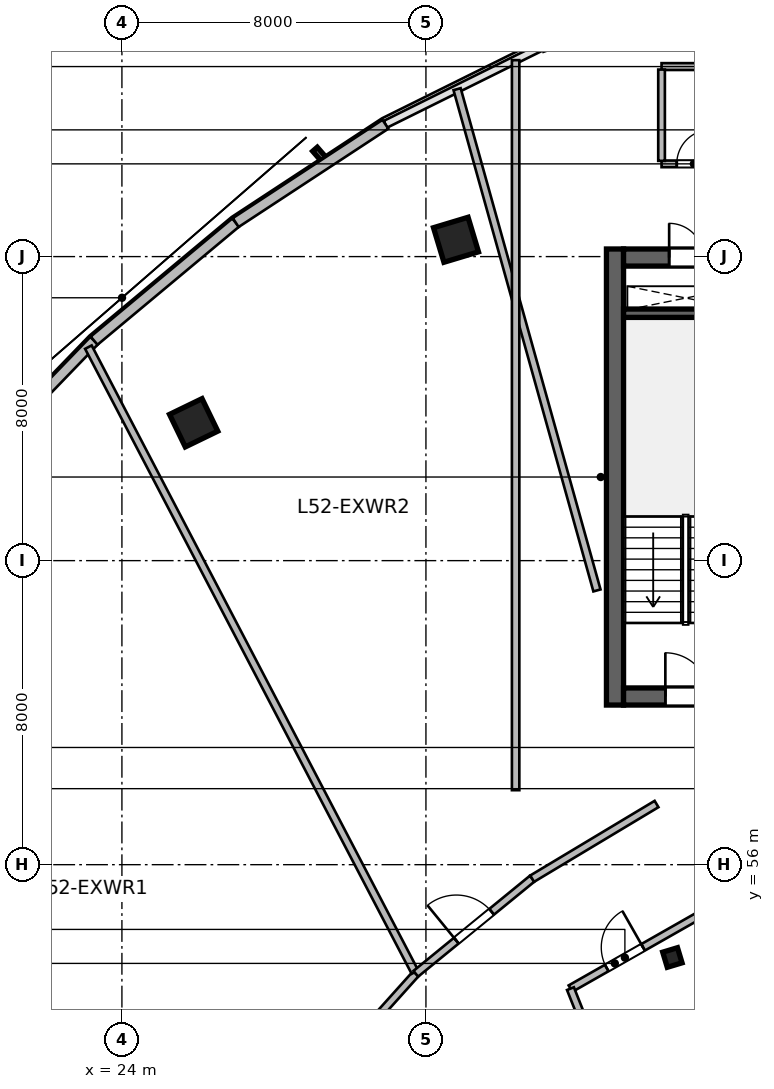
"""IFC4 building model, lengths in metres.
Left out: names, types, materials, properties, quantities, classifications, styles, units other than length and angle.
Written with IfcOpenShell. Run it as: python <this file> out.ifc"""

import sys

from ifc_helpers import new_model, si_unit, direction, frame, frame_2d, origin, origin_2d, place, context, subcontext, project, spatial, rectangle, i_section, extrude, source, transform, mapped, element, fill, save


model = new_model("IFC4")
c1 = context("Model", 3, precision=1e-05, world=origin(), true_north=direction((0.0, 1.0)))
c2 = subcontext(c1, "Body", "Model", "MODEL_VIEW")
j1 = project(units=[si_unit("LENGTHUNIT", "METRE"), si_unit("PLANEANGLEUNIT", "RADIAN")], contexts=[c1])
p1 = place(None, origin())
s1 = spatial("IfcSite", under=j1, at=p1, CompositionType="ELEMENT")
p2 = place(p1, origin())
s2 = spatial("IfcBuilding", under=s1, at=p2, CompositionType="ELEMENT")
p3 = place(p2, frame((0.0, 0.0, 215.7)))
s3 = spatial("IfcBuildingStorey", under=s2, at=p3, CompositionType="ELEMENT", Elevation=215.7)
m1 = source(origin(), c2, "Body", "SweptSolid", [
    extrude(rectangle(XDim=12.0, YDim=0.45, at=frame_2d((6.0, 0.0))), origin(), (0.0, 0.0, 1.0), 3.9),
])
p4 = place(p3, frame((36.975, 60.2, 0.0), z_axis=(0.0, 0.0, 1.0), x_axis=(0.0, 1.0, 0.0)))
e1 = element("IfcWall", 1, at=p4, inside=s3, PredefinedType="SHEAR", context=c2, shape_type="MappedRepresentation", body=[
    mapped(m1, transform((0.0, 0.0, 0.0), scale=1.0)),
])
m2 = source(origin(), c2, "Body", "SweptSolid", [
    extrude(rectangle(XDim=21.6, YDim=0.45, at=frame_2d((10.8, 0.0))), origin(), (0.0, 0.0, 1.0), 3.9),
])
p5 = place(p3, frame((37.2, 60.425, 0.0), z_axis=(0.0, 0.0, 1.0), x_axis=(1.0, 0.0, 0.0)))
e2 = element("IfcWall", 2, at=p5, inside=s3, PredefinedType="SHEAR", context=c2, shape_type="MappedRepresentation", body=[
    mapped(m2, transform((0.0, 0.0, 0.0), scale=1.0)),
])
p6 = place(p5, frame((1.1, 0.0, 0.0)))
e3 = element("IfcOpeningElement", 3, at=p6, cuts=e2, PredefinedType="OPENING", context=c2, shape_type="SweptSolid", body=[
    extrude(rectangle(XDim=1.15, YDim=2.15, at=frame_2d((0.575, 1.075))), frame((0.0, 0.235, 0.0), z_axis=(0.0, -1.0, 0.0), x_axis=(1.0, 0.0, 0.0)), (0.0, 0.0, 1.0), 0.47),
])
p7 = place(p5, frame((19.5, 0.0, 0.0)))
e4 = element("IfcOpeningElement", 4, at=p7, cuts=e2, PredefinedType="OPENING", context=c2, shape_type="SweptSolid", body=[
    extrude(rectangle(XDim=0.9, YDim=2.1, at=frame_2d((0.45, 1.05))), frame((0.0, 0.235, 0.0), z_axis=(0.0, -1.0, 0.0), x_axis=(1.0, 0.0, 0.0)), (0.0, 0.0, 1.0), 0.47),
])
p8 = place(p5, frame((12.02, 0.0, 0.0)))
e5 = element("IfcOpeningElement", 5, at=p8, cuts=e2, PredefinedType="OPENING", context=c2, shape_type="SweptSolid", body=[
    extrude(rectangle(XDim=1.6, YDim=2.15, at=frame_2d((0.8, 1.075))), frame((0.0, 0.235, 0.0), z_axis=(0.0, -1.0, 0.0), x_axis=(1.0, 0.0, 0.0)), (0.0, 0.0, 1.0), 0.47),
])
p9 = place(p3, frame((37.2, 71.975, 0.0), z_axis=(0.0, 0.0, 1.0), x_axis=(1.0, 0.0, 0.0)))
e6 = element("IfcWall", 6, at=p9, inside=s3, PredefinedType="SHEAR", context=c2, shape_type="MappedRepresentation", body=[
    mapped(m2, transform((0.0, 0.0, 0.0), scale=1.0)),
])
p10 = place(p9, frame((1.2, 0.0, 0.0)))
e7 = element("IfcOpeningElement", 7, at=p10, cuts=e6, PredefinedType="OPENING", context=c2, shape_type="SweptSolid", body=[
    extrude(rectangle(XDim=0.9, YDim=2.1, at=frame_2d((0.45, 1.05))), frame((0.0, 0.235, 0.0), z_axis=(0.0, -1.0, 0.0), x_axis=(1.0, 0.0, 0.0)), (0.0, 0.0, 1.0), 0.47),
])
p11 = place(p9, frame((14.7, 0.0, 0.0)))
e8 = element("IfcOpeningElement", 8, at=p11, cuts=e6, PredefinedType="OPENING", context=c2, shape_type="SweptSolid", body=[
    extrude(rectangle(XDim=1.2, YDim=2.15, at=frame_2d((0.6, 1.075))), frame((0.0, 0.235, 0.0), z_axis=(0.0, -1.0, 0.0), x_axis=(1.0, 0.0, 0.0)), (0.0, 0.0, 1.0), 0.47),
])
p12 = place(p9, frame((4.15, 0.0, 0.0)))
e9 = element("IfcOpeningElement", 9, at=p12, cuts=e6, PredefinedType="OPENING", context=c2, shape_type="SweptSolid", body=[
    extrude(rectangle(XDim=1.3, YDim=2.15, at=frame_2d((0.65, 1.075))), frame((0.0, 0.235, 0.0), z_axis=(0.0, -1.0, 0.0), x_axis=(1.0, 0.0, 0.0)), (0.0, 0.0, 1.0), 0.47),
])
p13 = place(p9, frame((7.25, 0.0, 0.0)))
e10 = element("IfcOpeningElement", 10, at=p13, cuts=e6, PredefinedType="OPENING", context=c2, shape_type="SweptSolid", body=[
    extrude(rectangle(XDim=0.9, YDim=2.1, at=frame_2d((0.45, 1.05))), frame((0.0, 0.235, 0.0), z_axis=(0.0, -1.0, 0.0), x_axis=(1.0, 0.0, 0.0)), (0.0, 0.0, 1.0), 0.47),
])
m3 = source(origin(), c2, "Body", "SweptSolid", [
    extrude(rectangle(XDim=3.27, YDim=0.22, at=frame_2d((1.635, 0.0))), origin(), (0.0, 0.0, 1.0), 3.9),
])
p14 = place(p3, frame((37.2, 70.51, 0.0), z_axis=(0.0, 0.0, 1.0), x_axis=(1.0, 0.0, 0.0)))
e11 = element("IfcWall", 11, at=p14, inside=s3, PredefinedType="SHEAR", context=c2, shape_type="MappedRepresentation", body=[
    mapped(m3, transform((0.0, 0.0, 0.0), scale=1.0)),
])
m4 = source(origin(), c2, "Body", "SweptSolid", [
    extrude(rectangle(XDim=0.95, YDim=0.95, at=origin_2d()), origin(), (0.0, 0.0, 1.0), 3.9),
])
p15 = place(p3, frame((25.888, 67.627, 0.0), z_axis=(0.0, 0.0, 1.0), x_axis=(-0.436173672171, 0.899862504889, 0.0)))
e12 = element("IfcColumn", 12, at=p15, inside=s3, PredefinedType="COLUMN", context=c2, shape_type="MappedRepresentation", body=[
    mapped(m4, transform((0.0, 0.0, 0.0), scale=1.0)),
])
m5 = source(origin(), c2, "Body", "SweptSolid", [
    extrude(i_section(OverallWidth=0.406, OverallDepth=0.416, WebThickness=0.03, FlangeThickness=0.048, at=origin_2d()), origin(), (0.0, 0.0, 1.0), 3.9),
])
p16 = place(p3, frame((38.485, 53.558, 0.0), z_axis=(0.0, 0.0, 1.0), x_axis=(-0.288697611798, 0.957420330337, 0.0)))
e13 = element("IfcColumn", 13, at=p16, inside=s3, PredefinedType="COLUMN", context=c2, shape_type="MappedRepresentation", body=[
    mapped(m5, transform((0.0, 0.0, 0.0), scale=1.0)),
])
p17 = place(p3, frame((32.791, 72.442, 0.0), z_axis=(0.0, 0.0, 1.0), x_axis=(-0.288697611798, 0.957420330337, 0.0)))
e14 = element("IfcColumn", 14, at=p17, inside=s3, PredefinedType="COLUMN", context=c2, shape_type="MappedRepresentation", body=[
    mapped(m4, transform((0.0, 0.0, 0.0), scale=1.0)),
])
m6 = source(origin(), c2, "Body", "SweptSolid", [
    extrude(rectangle(XDim=5.001, YDim=0.28, at=frame_2d((2.5, 0.0))), origin(), (0.0, 0.0, 1.0), 3.64),
])
p18 = place(p3, frame((19.795, 66.19, 0.0), z_axis=(0.0, 0.0, 1.0), x_axis=(0.694572731818, 0.719422490762, 0.0)))
e15 = element("IfcWall", 15, at=p18, inside=s3, PredefinedType="SOLIDWALL", context=c2, shape_type="MappedRepresentation", body=[
    mapped(m6, transform((0.0, 0.0, 0.0), scale=1.0)),
])
m7 = source(origin(), c2, "Body", "SweptSolid", [
    extrude(rectangle(XDim=4.852, YDim=0.28, at=frame_2d((2.426, 0.0))), origin(), (0.0, 0.0, 1.0), 3.64),
])
p19 = place(p3, frame((23.268, 69.788, 0.0), z_axis=(0.0, 0.0, 1.0), x_axis=(0.767936605821, 0.640525853843, 0.0)))
e16 = element("IfcWall", 16, at=p19, inside=s3, PredefinedType="SOLIDWALL", context=c2, shape_type="MappedRepresentation", body=[
    mapped(m7, transform((0.0, 0.0, 0.0), scale=1.0)),
])
m8 = source(origin(), c2, "Body", "SweptSolid", [
    extrude(rectangle(XDim=4.713, YDim=0.28, at=frame_2d((2.356, 0.0))), origin(), (0.0, 0.0, 1.0), 3.64),
])
p20 = place(p3, frame((26.994, 72.896, 0.0), z_axis=(0.0, 0.0, 1.0), x_axis=(0.835974386457, 0.548768462275, 0.0)))
e17 = element("IfcWall", 17, at=p20, inside=s3, PredefinedType="SOLIDWALL", context=c2, shape_type="MappedRepresentation", body=[
    mapped(m8, transform((0.0, 0.0, 0.0), scale=1.0)),
])
m9 = source(origin(), c2, "Body", "SweptSolid", [
    extrude(rectangle(XDim=4.0, YDim=0.175, at=frame_2d((2.0, 0.0))), origin(), (0.0, 0.0, 1.0), 3.64),
])
p21 = place(p3, frame((38.2, 74.44, 0.0), z_axis=(0.0, 0.0, 1.0), x_axis=(1.0, 0.0, 0.0)))
e18 = element("IfcWall", 18, at=p21, inside=s3, PredefinedType="PARTITIONING", context=c2, shape_type="MappedRepresentation", body=[
    mapped(m9, transform((0.0, 0.0, 0.0), scale=1.0)),
])
p22 = place(p21, frame((0.4, 0.0, 0.0)))
e19 = element("IfcOpeningElement", 19, at=p22, cuts=e18, PredefinedType="OPENING", context=c2, shape_type="SweptSolid", body=[
    extrude(rectangle(XDim=0.9, YDim=2.08, at=frame_2d((0.45, 1.04))), frame((0.0, 0.098, 0.0), z_axis=(0.0, -1.0, 0.0), x_axis=(1.0, 0.0, 0.0)), (0.0, 0.0, 1.0), 0.195),
])
m10 = source(origin(), c2, "Body", "SweptSolid", [
    extrude(rectangle(XDim=4.0, YDim=0.18, at=frame_2d((2.0, 0.0))), origin(), (0.0, 0.0, 1.0), 3.64),
])
p23 = place(p3, frame((38.2, 77.0, 0.0), z_axis=(0.0, 0.0, 1.0), x_axis=(1.0, 0.0, 0.0)))
e20 = element("IfcWall", 20, at=p23, inside=s3, PredefinedType="PLUMBINGWALL", context=c2, shape_type="MappedRepresentation", body=[
    mapped(m10, transform((0.0, 0.0, 0.0), scale=1.0)),
])
m11 = source(origin(), c2, "Body", "SweptSolid", [
    extrude(rectangle(XDim=2.403, YDim=0.175, at=frame_2d((1.201, 0.0))), origin(), (0.0, 0.0, 1.0), 3.64),
])
p24 = place(p3, frame((38.2, 74.519, 0.0), z_axis=(0.0, 0.0, 1.0), x_axis=(0.0, 1.0, 0.0)))
e21 = element("IfcWall", 21, at=p24, inside=s3, PredefinedType="PARTITIONING", context=c2, shape_type="MappedRepresentation", body=[
    mapped(m11, transform((0.0, 0.0, 0.0), scale=1.0)),
])
m12 = source(origin(), c2, "Body", "SweptSolid", [
    extrude(rectangle(XDim=4.796, YDim=0.195, at=frame_2d((2.398, 0.0))), origin(), (0.0, 0.0, 1.0), 3.64),
])
p25 = place(p3, frame((35.803, 52.738, 0.0), z_axis=(0.0, 0.0, 1.0), x_axis=(0.869231352707, 0.494405557686, 0.0)))
e22 = element("IfcWall", 22, at=p25, inside=s3, PredefinedType="PARTITIONING", context=c2, shape_type="MappedRepresentation", body=[
    mapped(m12, transform((0.0, 0.0, 0.0), scale=1.0)),
])
p26 = place(p25, frame((1.098, 0.0, 0.0)))
e23 = element("IfcOpeningElement", 23, at=p26, cuts=e22, PredefinedType="OPENING", context=c2, shape_type="SweptSolid", body=[
    extrude(rectangle(XDim=1.1, YDim=2.15, at=frame_2d((0.55, 1.075))), frame((0.0, 0.107, 0.0), z_axis=(0.0, -1.0, 0.0), x_axis=(1.0, 0.0, 0.0)), (0.0, 0.0, 1.0), 0.215),
])
m13 = source(origin(), c2, "Body", "SweptSolid", [
    extrude(rectangle(XDim=4.32, YDim=0.195, at=frame_2d((2.16, 0.0))), origin(), (0.0, 0.0, 1.0), 3.64),
])
p27 = place(p3, frame((37.396, 48.723, 0.0), z_axis=(0.0, 0.0, 1.0), x_axis=(-0.368846295269, 0.929490403644, 0.0)))
e24 = element("IfcWall", 24, at=p27, inside=s3, PredefinedType="PARTITIONING", context=c2, shape_type="MappedRepresentation", body=[
    mapped(m13, transform((0.0, 0.0, 0.0), scale=1.0)),
])
m14 = source(origin(), c2, "Body", "SweptSolid", [
    extrude(rectangle(XDim=5.407, YDim=0.195, at=frame_2d((2.704, 0.0))), origin(), (0.0, 0.0, 1.0), 3.64),
])
p28 = place(p3, frame((28.122, 49.105, 0.0), z_axis=(0.0, 0.0, 1.0), x_axis=(0.667851383423, 0.744294652447, 0.0)))
e25 = element("IfcWall", 25, at=p28, inside=s3, PredefinedType="PARTITIONING", context=c2, shape_type="MappedRepresentation", body=[
    mapped(m14, transform((0.0, 0.0, 0.0), scale=1.0)),
])
m15 = source(origin(), c2, "Body", "SweptSolid", [
    extrude(rectangle(XDim=16.854, YDim=0.195, at=frame_2d((8.427, 0.0))), origin(), (0.0, 0.0, 1.0), 3.64),
])
p29 = place(p3, frame((25.024, 44.369, 0.0), z_axis=(0.0, 0.0, 1.0), x_axis=(-0.716517105841, 0.697569521294, 0.0)))
e26 = element("IfcWall", 26, at=p29, inside=s3, PredefinedType="PARTITIONING", context=c2, shape_type="MappedRepresentation", body=[
    mapped(m15, transform((0.0, 0.0, 0.0), scale=1.0)),
])
m16 = source(origin(), c2, "Body", "SweptSolid", [
    extrude(rectangle(XDim=18.554, YDim=0.195, at=frame_2d((9.277, 0.0))), origin(), (0.0, 0.0, 1.0), 3.64),
])
p30 = place(p3, frame((31.71, 53.174, 0.0), z_axis=(0.0, 0.0, 1.0), x_axis=(-0.463116799203, 0.886297258427, 0.0)))
e27 = element("IfcWall", 27, at=p30, inside=s3, PredefinedType="PARTITIONING", context=c2, shape_type="MappedRepresentation", body=[
    mapped(m16, transform((0.0, 0.0, 0.0), scale=1.0)),
])
m17 = source(origin(), c2, "Body", "SweptSolid", [
    extrude(rectangle(XDim=3.954, YDim=0.195, at=frame_2d((1.977, 0.0))), origin(), (0.0, 0.0, 1.0), 3.64),
])
p31 = place(p3, frame((31.733, 53.13, 0.0), z_axis=(0.0, 0.0, 1.0), x_axis=(0.774345047596, 0.632763579281, 0.0)))
e28 = element("IfcWall", 28, at=p31, inside=s3, PredefinedType="PARTITIONING", context=c2, shape_type="MappedRepresentation", body=[
    mapped(m17, transform((0.0, 0.0, 0.0), scale=1.0)),
])
p32 = place(p31, frame((1.377, 0.0, 0.0)))
e29 = element("IfcOpeningElement", 29, at=p32, cuts=e28, PredefinedType="OPENING", context=c2, shape_type="SweptSolid", body=[
    extrude(rectangle(XDim=1.2, YDim=2.15, at=frame_2d((0.6, 1.075))), frame((0.0, 0.107, 0.0), z_axis=(0.0, -1.0, 0.0), x_axis=(1.0, 0.0, 0.0)), (0.0, 0.0, 1.0), 0.215),
])
m18 = source(origin(), c2, "Body", "SweptSolid", [
    extrude(rectangle(XDim=3.817, YDim=0.195, at=frame_2d((1.909, 0.0))), origin(), (0.0, 0.0, 1.0), 3.64),
])
p33 = place(p3, frame((34.795, 55.632, 0.0), z_axis=(0.0, 0.0, 1.0), x_axis=(0.857453418218, 0.514561595522, 0.0)))
e30 = element("IfcWall", 30, at=p33, inside=s3, PredefinedType="PARTITIONING", context=c2, shape_type="MappedRepresentation", body=[
    mapped(m18, transform((0.0, 0.0, 0.0), scale=1.0)),
])
m19 = source(origin(), c2, "Body", "SweptSolid", [
    extrude(rectangle(XDim=13.694, YDim=0.195, at=frame_2d((6.847, 0.0))), origin(), (0.0, 0.0, 1.0), 3.64),
])
p34 = place(p3, frame((36.5, 63.216, 0.0), z_axis=(0.0, 0.0, 1.0), x_axis=(-0.268753576604, 0.963208967495, 0.0)))
e31 = element("IfcWall", 31, at=p34, inside=s3, PredefinedType="PARTITIONING", context=c2, shape_type="MappedRepresentation", body=[
    mapped(m19, transform((0.0, 0.0, 0.0), scale=1.0)),
])
m20 = source(origin(), c2, "Body", "SweptSolid", [
    extrude(rectangle(XDim=19.209, YDim=0.195, at=frame_2d((9.604, 0.0))), origin(), (0.0, 0.0, 1.0), 3.64),
])
p35 = place(p3, frame((34.36, 57.96, 0.0), z_axis=(0.0, 0.0, 1.0), x_axis=(0.0, 1.0, 0.0)))
e32 = element("IfcWall", 32, at=p35, inside=s3, PredefinedType="PARTITIONING", context=c2, shape_type="MappedRepresentation", body=[
    mapped(m20, transform((0.0, 0.0, 0.0), scale=1.0)),
])
m21 = source(origin(), c2, "Body", "SweptSolid", [
    extrude(rectangle(XDim=1.15, YDim=2.15, at=frame_2d((0.575, 1.075))), frame((0.0, 0.025, 0.0), z_axis=(0.0, -1.0, 0.0), x_axis=(1.0, 0.0, 0.0)), (0.0, 0.0, 1.0), 0.05),
])
p36 = place(p6, origin())
e33 = element("IfcDoor", 33, at=p36, inside=s3, OperationType="SINGLE_SWING_LEFT", PredefinedType="DOOR", context=c2, shape_type="MappedRepresentation", body=[
    mapped(m21, transform((0.0, 0.0, 0.0), scale=1.0)),
])
fill(e3, e33)
m22 = source(origin(), c2, "Body", "SweptSolid", [
    extrude(rectangle(XDim=0.9, YDim=2.1, at=frame_2d((0.45, 1.05))), frame((0.0, 0.025, 0.0), z_axis=(0.0, -1.0, 0.0), x_axis=(1.0, 0.0, 0.0)), (0.0, 0.0, 1.0), 0.05),
])
p37 = place(p10, origin())
e34 = element("IfcDoor", 34, at=p37, inside=s3, OperationType="SINGLE_SWING_LEFT", PredefinedType="DOOR", context=c2, shape_type="MappedRepresentation", body=[
    mapped(m22, transform((0.0, 0.0, 0.0), scale=1.0)),
])
fill(e7, e34)
m23 = source(origin(), c2, "Body", "SweptSolid", [
    extrude(rectangle(XDim=0.9, YDim=2.08, at=frame_2d((0.45, 1.04))), frame((0.0, 0.025, 0.0), z_axis=(0.0, -1.0, 0.0), x_axis=(1.0, 0.0, 0.0)), (0.0, 0.0, 1.0), 0.05),
])
p38 = place(p22, origin())
e35 = element("IfcDoor", 35, at=p38, inside=s3, OperationType="SINGLE_SWING_RIGHT", PredefinedType="DOOR", context=c2, shape_type="MappedRepresentation", body=[
    mapped(m23, transform((0.0, 0.0, 0.0), scale=1.0)),
])
fill(e19, e35)
m24 = source(origin(), c2, "Body", "SweptSolid", [
    extrude(rectangle(XDim=1.1, YDim=2.15, at=frame_2d((0.55, 1.075))), frame((0.0, 0.025, 0.0), z_axis=(0.0, -1.0, 0.0), x_axis=(1.0, 0.0, 0.0)), (0.0, 0.0, 1.0), 0.05),
])
p39 = place(p26, origin())
e36 = element("IfcDoor", 36, at=p39, inside=s3, OperationType="SINGLE_SWING_RIGHT", PredefinedType="DOOR", context=c2, shape_type="MappedRepresentation", body=[
    mapped(m24, transform((0.0, 0.0, 0.0), scale=1.0)),
])
fill(e23, e36)
m25 = source(origin(), c2, "Body", "SweptSolid", [
    extrude(rectangle(XDim=1.2, YDim=2.15, at=frame_2d((0.6, 1.075))), frame((0.0, 0.025, 0.0), z_axis=(0.0, -1.0, 0.0), x_axis=(1.0, 0.0, 0.0)), (0.0, 0.0, 1.0), 0.05),
])
p40 = place(p32, origin())
e37 = element("IfcDoor", 37, at=p40, inside=s3, OperationType="SINGLE_SWING_LEFT", PredefinedType="DOOR", context=c2, shape_type="MappedRepresentation", body=[
    mapped(m25, transform((0.0, 0.0, 0.0), scale=1.0)),
])
fill(e29, e37)
save(model, sys.argv[1])
